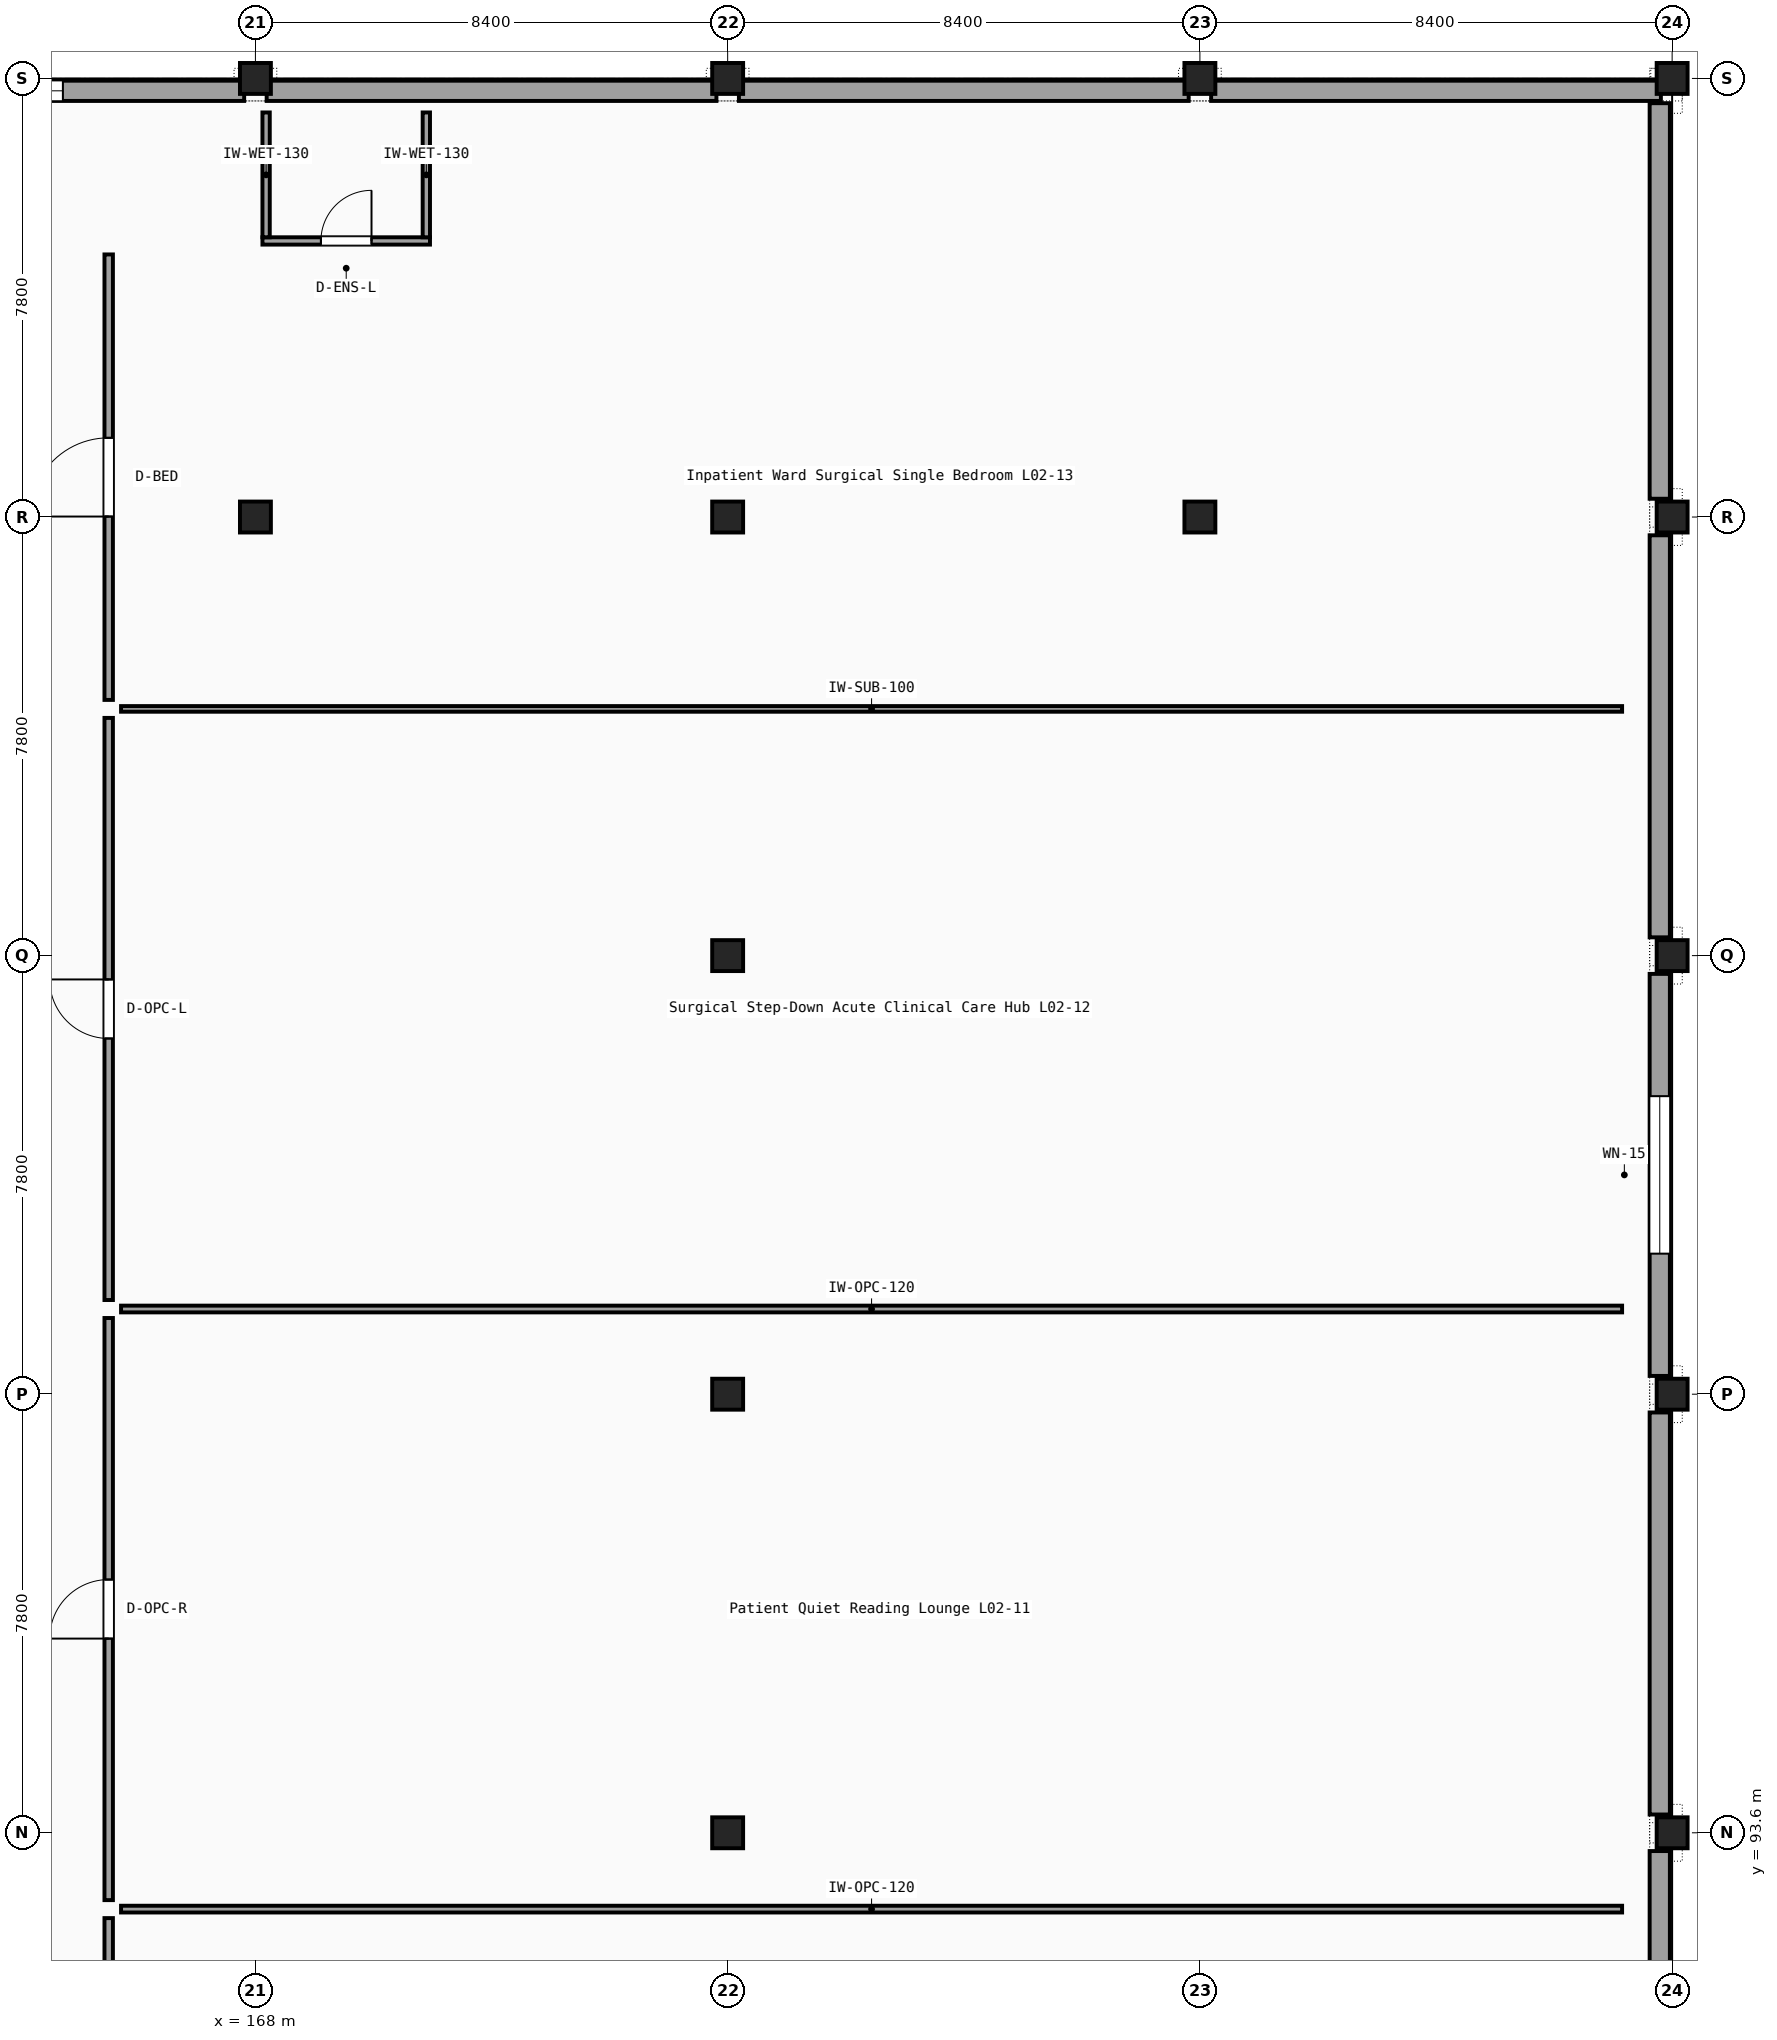
"""IFC4 building model, lengths in metres.
Left out: names, types, materials, properties, quantities, classifications, styles, units other than length and angle.
Written with IfcOpenShell. Run it as: python <this file> out.ifc"""

import sys

from ifc_helpers import new_model, si_unit, direction, frame, frame_2d, origin, origin_2d, place, context, subcontext, project, spatial, rectangle, i_section, extrude, element, fill, save


model = new_model("IFC4")
c1 = context("Model", 3, precision=1e-05, world=origin(), true_north=direction((0.0, 1.0)))
c2 = subcontext(c1, "Body", "Model", "MODEL_VIEW")
j1 = project(units=[si_unit("LENGTHUNIT", "METRE"), si_unit("PLANEANGLEUNIT", "RADIAN")], contexts=[c1])
p1 = place(None, origin())
s1 = spatial("IfcSite", under=j1, at=p1, CompositionType="ELEMENT")
p2 = place(p1, origin())
s2 = spatial("IfcBuilding", under=s1, at=p2, CompositionType="ELEMENT")
p3 = place(p2, frame((0.0, 0.0, 10.2)))
s3 = spatial("IfcBuildingStorey", under=s2, at=p3, CompositionType="ELEMENT", Elevation=10.2)
for number, where, z_axis, x_axis in (
    (1, (168.0, 117.0, 0.0), (0.0, 0.0, 1.0), (1.0, 0.0, 0.0)),
    (2, (168.0, 124.8, 0.0), (0.0, 0.0, 1.0), (1.0, 0.0, 0.0)),
    (3, (176.4, 93.6, 0.0), (0.0, 0.0, 1.0), (1.0, 0.0, 0.0)),
    (4, (176.4, 101.4, 0.0), (0.0, 0.0, 1.0), (1.0, 0.0, 0.0)),
    (5, (176.4, 109.2, 0.0), (0.0, 0.0, 1.0), (1.0, 0.0, 0.0)),
    (6, (176.4, 117.0, 0.0), (0.0, 0.0, 1.0), (1.0, 0.0, 0.0)),
    (7, (176.4, 124.8, 0.0), (0.0, 0.0, 1.0), (1.0, 0.0, 0.0)),
    (8, (184.8, 117.0, 0.0), (0.0, 0.0, 1.0), (1.0, 0.0, 0.0)),
    (9, (184.8, 124.8, 0.0), (0.0, 0.0, 1.0), (1.0, 0.0, 0.0)),
    (10, (193.2, 93.6, 0.0), (0.0, 0.0, 1.0), (1.0, 0.0, 0.0)),
    (11, (193.2, 101.4, 0.0), (0.0, 0.0, 1.0), (1.0, 0.0, 0.0)),
    (12, (193.2, 109.2, 0.0), (0.0, 0.0, 1.0), (1.0, 0.0, 0.0)),
    (13, (193.2, 117.0, 0.0), (0.0, 0.0, 1.0), (1.0, 0.0, 0.0)),
    (14, (193.2, 124.8, 0.0), (0.0, 0.0, 1.0), (1.0, 0.0, 0.0)),
):
    element("IfcColumn", number, at=place(p3, frame(where, z_axis=z_axis, x_axis=x_axis)), inside=s3, PredefinedType="COLUMN", context=c2, shape_type="SweptSolid", body=[
        extrude(i_section(OverallWidth=0.3, OverallDepth=0.55, WebThickness=0.015, FlangeThickness=0.029, FilletRadius=0.027, at=origin_2d()), origin(), (0.0, 0.0, 1.0), 4.65),
    ])
p4 = place(p3, frame((160.0, 124.58, 0.0), z_axis=(0.0, 0.0, 1.0), x_axis=(1.0, 0.0, 0.0)))
e15 = element("IfcWall", 15, at=p4, inside=s3, PredefinedType="SOLIDWALL", context=c2, shape_type="SweptSolid", body=[
    extrude(rectangle(XDim=7.8, YDim=0.36, at=frame_2d((3.9, 0.0))), origin(), (0.0, 0.0, 1.0), 4.05),
])
p5 = place(p4, frame((3.225, 0.0, 1.0)))
e16 = element("IfcOpeningElement", 16, at=p5, cuts=e15, PredefinedType="OPENING", context=c2, shape_type="SweptSolid", body=[
    extrude(rectangle(XDim=1.35, YDim=1.45, at=frame_2d((0.675, 0.725))), frame((0.0, 0.19, 0.0), z_axis=(0.0, -1.0, 0.0), x_axis=(1.0, 0.0, 0.0)), (0.0, 0.0, 1.0), 0.38),
])
for number, where, z_axis, x_axis in (
    (17, (168.2, 124.58, 0.0), (0.0, 0.0, 1.0), (1.0, 0.0, 0.0)),
    (18, (176.6, 124.58, 0.0), (0.0, 0.0, 1.0), (1.0, 0.0, 0.0)),
):
    element("IfcWall", number, at=place(p3, frame(where, z_axis=z_axis, x_axis=x_axis)), inside=s3, PredefinedType="SOLIDWALL", context=c2, shape_type="SweptSolid", body=[
        extrude(rectangle(XDim=8.0, YDim=0.36, at=frame_2d((4.0, 0.0))), origin(), (0.0, 0.0, 1.0), 4.05),
    ])
p6 = place(p3, frame((185.0, 124.58, 0.0), z_axis=(0.0, 0.0, 1.0), x_axis=(1.0, 0.0, 0.0)))
e19 = element("IfcWall", 19, at=p6, inside=s3, PredefinedType="SOLIDWALL", context=c2, shape_type="SweptSolid", body=[
    extrude(rectangle(XDim=8.0, YDim=0.36, at=frame_2d((4.0, 0.0))), origin(), (0.0, 0.0, 1.0), 4.0),
])
for number, where, z_axis, x_axis in (
    (20, (192.98, 86.125, 0.0), (0.0, 0.0, 1.0), (0.0, 1.0, 0.0)),
    (21, (192.98, 93.925, 0.0), (0.0, 0.0, 1.0), (0.0, 1.0, 0.0)),
):
    element("IfcWall", number, at=place(p3, frame(where, z_axis=z_axis, x_axis=x_axis)), inside=s3, PredefinedType="SOLIDWALL", context=c2, shape_type="SweptSolid", body=[
        extrude(rectangle(XDim=7.15, YDim=0.36, at=frame_2d((3.575, 0.0))), origin(), (0.0, 0.0, 1.0), 3.95),
    ])
p7 = place(p3, frame((192.98, 101.725, 0.0), z_axis=(0.0, 0.0, 1.0), x_axis=(0.0, 1.0, 0.0)))
e22 = element("IfcWall", 22, at=p7, inside=s3, PredefinedType="SOLIDWALL", context=c2, shape_type="SweptSolid", body=[
    extrude(rectangle(XDim=7.15, YDim=0.36, at=frame_2d((3.575, 0.0))), origin(), (0.0, 0.0, 1.0), 3.95),
])
p8 = place(p7, frame((2.175, 0.0, 0.75)))
e23 = element("IfcOpeningElement", 23, at=p8, cuts=e22, PredefinedType="OPENING", context=c2, shape_type="SweptSolid", body=[
    extrude(rectangle(XDim=2.8, YDim=1.75, at=frame_2d((1.4, 0.875))), frame((0.0, 0.19, 0.0), z_axis=(0.0, -1.0, 0.0), x_axis=(1.0, 0.0, 0.0)), (0.0, 0.0, 1.0), 0.38),
])
p9 = place(p3, frame((192.98, 109.525, 0.0), z_axis=(0.0, 0.0, 1.0), x_axis=(0.0, 1.0, 0.0)))
e24 = element("IfcWall", 24, at=p9, inside=s3, PredefinedType="SOLIDWALL", context=c2, shape_type="SweptSolid", body=[
    extrude(rectangle(XDim=7.15, YDim=0.36, at=frame_2d((3.575, 0.0))), origin(), (0.0, 0.0, 1.0), 3.95),
])
p10 = place(p3, frame((192.98, 117.325, 0.0), z_axis=(0.0, 0.0, 1.0), x_axis=(0.0, 1.0, 0.0)))
e25 = element("IfcWall", 25, at=p10, inside=s3, PredefinedType="SOLIDWALL", context=c2, shape_type="SweptSolid", body=[
    extrude(rectangle(XDim=7.035, YDim=0.36, at=frame_2d((3.518, 0.0))), origin(), (0.0, 0.0, 1.0), 3.95),
])
p11 = place(p3, frame((165.39, 81.65, 0.0), z_axis=(0.0, 0.0, 1.0), x_axis=(0.0, 1.0, 0.0)))
e26 = element("IfcWall", 26, at=p11, inside=s3, PredefinedType="PARTITIONING", context=c2, shape_type="SweptSolid", body=[
    extrude(rectangle(XDim=10.433, YDim=0.15, at=frame_2d((5.216, 0.0))), origin(), (0.0, 0.0, 1.0), 4.05),
])
p12 = place(p11, frame((4.691, 0.0, 0.0)))
e27 = element("IfcOpeningElement", 27, at=p12, cuts=e26, PredefinedType="OPENING", context=c2, shape_type="SweptSolid", body=[
    extrude(rectangle(XDim=1.05, YDim=2.15, at=frame_2d((0.525, 1.075))), frame((0.0, 0.085, 0.0), z_axis=(0.0, -1.0, 0.0), x_axis=(1.0, 0.0, 0.0)), (0.0, 0.0, 1.0), 0.17),
])
p13 = place(p3, frame((165.61, 92.242, 0.0), z_axis=(0.0, 0.0, 1.0), x_axis=(1.0, 0.0, 0.0)))
e28 = element("IfcWall", 28, at=p13, inside=s3, PredefinedType="PARTITIONING", context=c2, shape_type="SweptSolid", body=[
    extrude(rectangle(XDim=26.7, YDim=0.12, at=frame_2d((13.35, 0.0))), origin(), (0.0, 0.0, 1.0), 4.08),
])
p14 = place(p3, frame((165.39, 92.403, 0.0), z_axis=(0.0, 0.0, 1.0), x_axis=(0.0, 1.0, 0.0)))
e29 = element("IfcWall", 29, at=p14, inside=s3, PredefinedType="PARTITIONING", context=c2, shape_type="SweptSolid", body=[
    extrude(rectangle(XDim=10.352, YDim=0.15, at=frame_2d((5.176, 0.0))), origin(), (0.0, 0.0, 1.0), 3.95),
])
p15 = place(p14, frame((4.651, 0.0, 0.0)))
e30 = element("IfcOpeningElement", 30, at=p15, cuts=e29, PredefinedType="OPENING", context=c2, shape_type="SweptSolid", body=[
    extrude(rectangle(XDim=1.05, YDim=2.15, at=frame_2d((0.525, 1.075))), frame((0.0, 0.085, 0.0), z_axis=(0.0, -1.0, 0.0), x_axis=(1.0, 0.0, 0.0)), (0.0, 0.0, 1.0), 0.17),
])
p16 = place(p3, frame((165.61, 102.915, 0.0), z_axis=(0.0, 0.0, 1.0), x_axis=(1.0, 0.0, 0.0)))
e31 = element("IfcWall", 31, at=p16, inside=s3, PredefinedType="PARTITIONING", context=c2, shape_type="SweptSolid", body=[
    extrude(rectangle(XDim=26.7, YDim=0.12, at=frame_2d((13.35, 0.0))), origin(), (0.0, 0.0, 1.0), 4.08),
])
p17 = place(p3, frame((165.39, 103.075, 0.0), z_axis=(0.0, 0.0, 1.0), x_axis=(0.0, 1.0, 0.0)))
e32 = element("IfcWall", 32, at=p17, inside=s3, PredefinedType="PARTITIONING", context=c2, shape_type="SweptSolid", body=[
    extrude(rectangle(XDim=10.353, YDim=0.15, at=frame_2d((5.176, 0.0))), origin(), (0.0, 0.0, 1.0), 3.95),
])
p18 = place(p17, frame((4.651, 0.0, 0.0)))
e33 = element("IfcOpeningElement", 33, at=p18, cuts=e32, PredefinedType="OPENING", context=c2, shape_type="SweptSolid", body=[
    extrude(rectangle(XDim=1.05, YDim=2.15, at=frame_2d((0.525, 1.075))), frame((0.0, 0.085, 0.0), z_axis=(0.0, -1.0, 0.0), x_axis=(1.0, 0.0, 0.0)), (0.0, 0.0, 1.0), 0.17),
])
p19 = place(p3, frame((165.61, 113.587, 0.0), z_axis=(0.0, 0.0, 1.0), x_axis=(1.0, 0.0, 0.0)))
e34 = element("IfcWall", 34, at=p19, inside=s3, PredefinedType="PARTITIONING", context=c2, shape_type="SweptSolid", body=[
    extrude(rectangle(XDim=26.7, YDim=0.1, at=frame_2d((13.35, 0.0))), origin(), (0.0, 0.0, 1.0), 4.08),
])
p20 = place(p3, frame((165.39, 113.748, 0.0), z_axis=(0.0, 0.0, 1.0), x_axis=(0.0, 1.0, 0.0)))
e35 = element("IfcWall", 35, at=p20, inside=s3, PredefinedType="PARTITIONING", context=c2, shape_type="SweptSolid", body=[
    extrude(rectangle(XDim=7.922, YDim=0.15, at=frame_2d((3.961, 0.0))), origin(), (0.0, 0.0, 1.0), 3.95),
])
p21 = place(p20, frame((3.261, 0.0, 0.0)))
e36 = element("IfcOpeningElement", 36, at=p21, cuts=e35, PredefinedType="OPENING", context=c2, shape_type="SweptSolid", body=[
    extrude(rectangle(XDim=1.4, YDim=2.2, at=frame_2d((0.7, 1.1))), frame((0.0, 0.085, 0.0), z_axis=(0.0, -1.0, 0.0), x_axis=(1.0, 0.0, 0.0)), (0.0, 0.0, 1.0), 0.17),
])
p22 = place(p3, frame((168.125, 121.91, 0.0), z_axis=(0.0, 0.0, 1.0), x_axis=(1.0, 0.0, 0.0)))
e37 = element("IfcWall", 37, at=p22, inside=s3, PredefinedType="PARTITIONING", context=c2, shape_type="SweptSolid", body=[
    extrude(rectangle(XDim=2.98, YDim=0.13, at=frame_2d((1.49, 0.0))), origin(), (0.0, 0.0, 1.0), 4.08),
])
p23 = place(p22, frame((1.04, 0.0, 0.0)))
e38 = element("IfcOpeningElement", 38, at=p23, cuts=e37, PredefinedType="OPENING", context=c2, shape_type="SweptSolid", body=[
    extrude(rectangle(XDim=0.9, YDim=2.1, at=frame_2d((0.45, 1.05))), frame((0.0, 0.075, 0.0), z_axis=(0.0, -1.0, 0.0), x_axis=(1.0, 0.0, 0.0)), (0.0, 0.0, 1.0), 0.15),
])
p24 = place(p3, frame((168.19, 121.975, 0.0), z_axis=(0.0, 0.0, 1.0), x_axis=(0.0, 1.0, 0.0)))
e39 = element("IfcWall", 39, at=p24, inside=s3, PredefinedType="PARTITIONING", context=c2, shape_type="SweptSolid", body=[
    extrude(rectangle(XDim=2.22, YDim=0.13, at=frame_2d((1.11, 0.0))), origin(), (0.0, 0.0, 1.0), 4.08),
])
p25 = place(p3, frame((171.04, 121.975, 0.0), z_axis=(0.0, 0.0, 1.0), x_axis=(0.0, 1.0, 0.0)))
e40 = element("IfcWall", 40, at=p25, inside=s3, PredefinedType="PARTITIONING", context=c2, shape_type="SweptSolid", body=[
    extrude(rectangle(XDim=2.22, YDim=0.13, at=frame_2d((1.11, 0.0))), origin(), (0.0, 0.0, 1.0), 4.37),
])
p26 = place(p5, origin())
e41 = element("IfcWindow", 41, at=p26, inside=s3, PartitioningType="SINGLE_PANEL", PredefinedType="WINDOW", context=c2, shape_type="SweptSolid", body=[
    extrude(rectangle(XDim=1.35, YDim=1.45, at=frame_2d((0.675, 0.725))), frame((0.0, 0.03, 0.0), z_axis=(0.0, -1.0, 0.0), x_axis=(1.0, 0.0, 0.0)), (0.0, 0.0, 1.0), 0.06),
])
fill(e16, e41)
p27 = place(p8, origin())
e42 = element("IfcWindow", 42, at=p27, inside=s3, PartitioningType="SINGLE_PANEL", PredefinedType="WINDOW", context=c2, shape_type="SweptSolid", body=[
    extrude(rectangle(XDim=2.8, YDim=1.75, at=frame_2d((1.4, 0.875))), frame((0.0, 0.03, 0.0), z_axis=(0.0, -1.0, 0.0), x_axis=(1.0, 0.0, 0.0)), (0.0, 0.0, 1.0), 0.06),
])
fill(e23, e42)
p28 = place(p15, origin())
e43 = element("IfcDoor", 43, at=p28, inside=s3, OperationType="SINGLE_SWING_LEFT", PredefinedType="DOOR", context=c2, shape_type="SweptSolid", body=[
    extrude(rectangle(XDim=1.05, YDim=2.15, at=frame_2d((0.525, 1.075))), frame((0.0, 0.025, 0.0), z_axis=(0.0, -1.0, 0.0), x_axis=(1.0, 0.0, 0.0)), (0.0, 0.0, 1.0), 0.05),
])
fill(e30, e43)
p29 = place(p18, origin())
e44 = element("IfcDoor", 44, at=p29, inside=s3, OperationType="SINGLE_SWING_RIGHT", PredefinedType="DOOR", context=c2, shape_type="SweptSolid", body=[
    extrude(rectangle(XDim=1.05, YDim=2.15, at=frame_2d((0.525, 1.075))), frame((0.0, 0.025, 0.0), z_axis=(0.0, -1.0, 0.0), x_axis=(1.0, 0.0, 0.0)), (0.0, 0.0, 1.0), 0.05),
])
fill(e33, e44)
p30 = place(p21, origin())
e45 = element("IfcDoor", 45, at=p30, inside=s3, OperationType="SINGLE_SWING_LEFT", PredefinedType="DOOR", context=c2, shape_type="SweptSolid", body=[
    extrude(rectangle(XDim=1.4, YDim=2.2, at=frame_2d((0.7, 1.1))), frame((0.0, 0.025, 0.0), z_axis=(0.0, -1.0, 0.0), x_axis=(1.0, 0.0, 0.0)), (0.0, 0.0, 1.0), 0.05),
])
fill(e36, e45)
p31 = place(p23, origin())
e46 = element("IfcDoor", 46, at=p31, inside=s3, OperationType="SINGLE_SWING_RIGHT", PredefinedType="DOOR", context=c2, shape_type="SweptSolid", body=[
    extrude(rectangle(XDim=0.9, YDim=2.1, at=frame_2d((0.45, 1.05))), frame((0.0, 0.025, 0.0), z_axis=(0.0, -1.0, 0.0), x_axis=(1.0, 0.0, 0.0)), (0.0, 0.0, 1.0), 0.05),
])
fill(e38, e46)
save(model, sys.argv[1])
